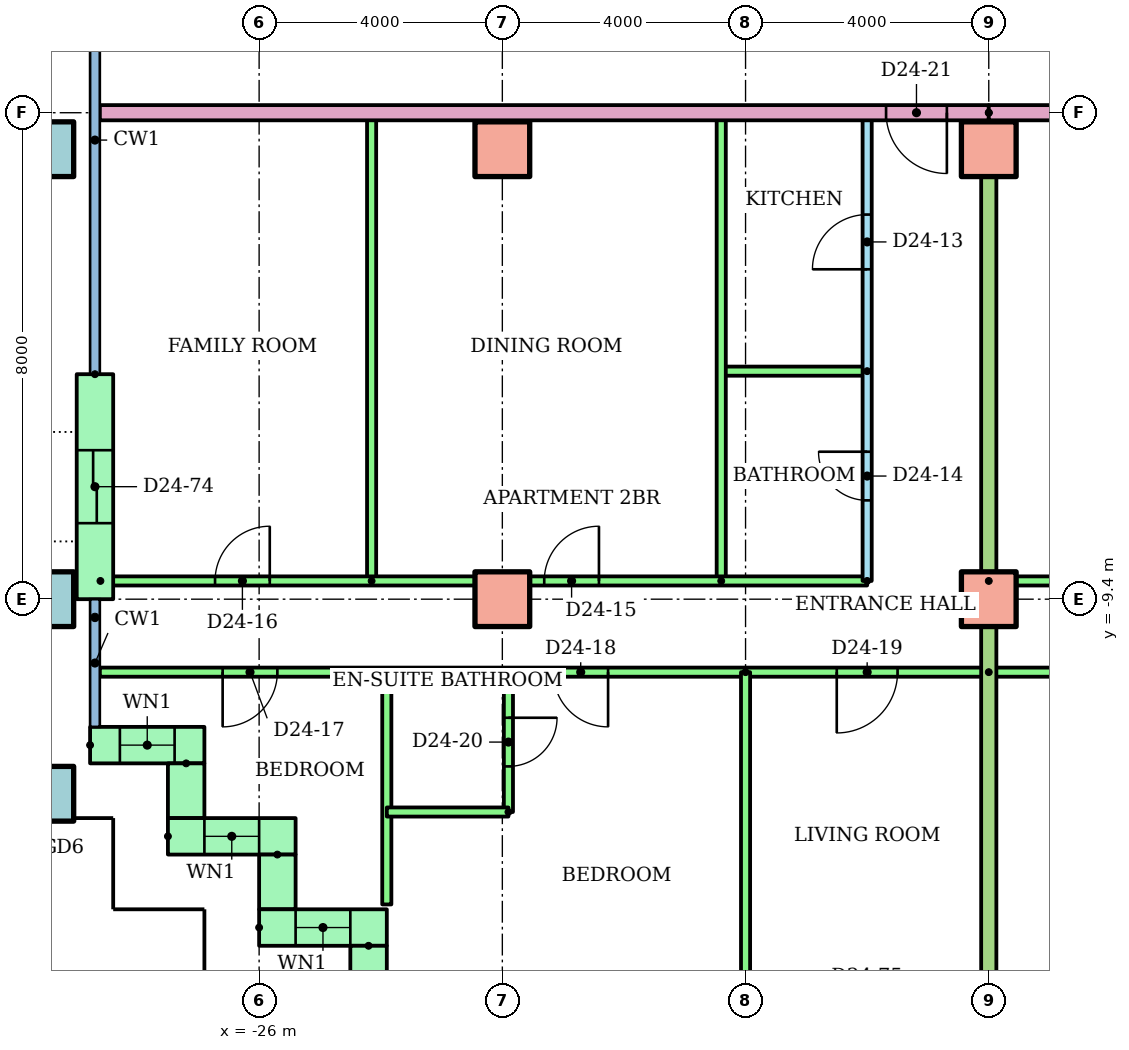
"""IFC4 building model, lengths in metres.
Left out: names, types, materials, properties, quantities, classifications, styles, units other than length and angle.
Written with IfcOpenShell. Run it as: python <this file> out.ifc"""

import sys

from ifc_helpers import new_model, si_unit, direction, frame, frame_2d, origin, origin_2d, place, context, subcontext, project, spatial, rectangle, hollow_rectangle, extrude, element, fill, save


model = new_model("IFC4")
c1 = context("Model", 3, precision=1e-05, world=origin(), true_north=direction((0.0, 1.0)))
c2 = subcontext(c1, "Body", "Model", "MODEL_VIEW")
j1 = project(units=[si_unit("LENGTHUNIT", "METRE"), si_unit("PLANEANGLEUNIT", "RADIAN")], contexts=[c1])
p1 = place(None, origin())
s1 = spatial("IfcSite", under=j1, at=p1, CompositionType="ELEMENT")
p2 = place(p1, origin())
s2 = spatial("IfcBuilding", under=s1, at=p2, CompositionType="ELEMENT")
p3 = place(p2, frame((0.0, 0.0, 93.5)))
s3 = spatial("IfcBuildingStorey", under=s2, at=p3, CompositionType="ELEMENT", Elevation=93.5)
for number, where in (
    (1, (-29.5, -12.6, 0.0)),
    (2, (-29.5, -9.4, 0.0)),
):
    element("IfcColumn", number, at=place(p3, frame(where)), inside=s3, PredefinedType="COLUMN", context=c2, shape_type="SweptSolid", body=[
        extrude(hollow_rectangle(XDim=0.9, YDim=0.9, WallThickness=0.045, at=origin_2d()), origin(), (0.0, 0.0, 1.0), 3.2),
    ])
for number, where in (
    (3, (-22.0, -9.4, 0.0)),
    (4, (-14.0, -9.4, 0.0)),
):
    element("IfcColumn", number, at=place(p3, frame(where)), inside=s3, PredefinedType="COLUMN", context=c2, shape_type="SweptSolid", body=[
        extrude(rectangle(XDim=0.9, YDim=0.9, at=origin_2d()), origin(), (0.0, 0.0, 1.0), 3.2),
    ])
p4 = place(p3, frame((-29.5, -2.0, 0.0)))
e5 = element("IfcColumn", 5, at=p4, inside=s3, PredefinedType="COLUMN", context=c2, shape_type="SweptSolid", body=[
    extrude(hollow_rectangle(XDim=0.9, YDim=0.9, WallThickness=0.045, at=origin_2d()), origin(), (0.0, 0.0, 1.0), 3.2),
])
for number, where in (
    (6, (-22.0, -2.0, 0.0)),
    (7, (-14.0, -2.0, 0.0)),
):
    element("IfcColumn", number, at=place(p3, frame(where)), inside=s3, PredefinedType="COLUMN", context=c2, shape_type="SweptSolid", body=[
        extrude(rectangle(XDim=0.9, YDim=0.9, at=origin_2d()), origin(), (0.0, 0.0, 1.0), 3.2),
    ])
p5 = place(p3, frame((-28.7, -5.7, 0.0), z_axis=(0.0, 0.0, 1.0), x_axis=(0.0, -1.0, 0.0)))
e8 = element("IfcWall", 8, at=p5, inside=s3, PredefinedType="STANDARD", context=c2, shape_type="SweptSolid", body=[
    extrude(rectangle(XDim=3.7, YDim=0.6, at=frame_2d((1.85, 0.0))), origin(), (0.0, 0.0, 1.0), 2.92),
])
p6 = place(p5, frame((1.25, 0.0, 0.0)))
e9 = element("IfcOpeningElement", 9, at=p6, cuts=e8, PredefinedType="OPENING", context=c2, shape_type="SweptSolid", body=[
    extrude(rectangle(XDim=1.2, YDim=2.1, at=frame_2d((0.6, 1.05))), frame((0.0, 0.31, 0.0), z_axis=(0.0, -1.0, 0.0), x_axis=(1.0, 0.0, 0.0)), (0.0, 0.0, 1.0), 0.62),
])
p7 = place(p3, frame((-28.78, -11.8, 0.0)))
e10 = element("IfcWall", 10, at=p7, inside=s3, PredefinedType="STANDARD", context=c2, shape_type="SweptSolid", body=[
    extrude(rectangle(XDim=1.88, YDim=0.6, at=frame_2d((0.94, 0.0))), origin(), (0.0, 0.0, 1.0), 2.92),
])
p8 = place(p7, frame((0.49, 0.0, 0.9)))
e11 = element("IfcOpeningElement", 11, at=p8, cuts=e10, PredefinedType="OPENING", context=c2, shape_type="SweptSolid", body=[
    extrude(rectangle(XDim=0.9, YDim=1.5, at=frame_2d((0.45, 0.75))), frame((0.0, 0.31, 0.0), z_axis=(0.0, -1.0, 0.0), x_axis=(1.0, 0.0, 0.0)), (0.0, 0.0, 1.0), 0.62),
])
p9 = place(p3, frame((-27.2, -12.1, 0.0), z_axis=(0.0, 0.0, 1.0), x_axis=(0.0, -1.0, 0.0)))
e12 = element("IfcWall", 12, at=p9, inside=s3, PredefinedType="STANDARD", context=c2, shape_type="SweptSolid", body=[
    extrude(rectangle(XDim=0.9, YDim=0.6, at=frame_2d((0.45, 0.0))), origin(), (0.0, 0.0, 1.0), 2.92),
])
p10 = place(p3, frame((-27.5, -13.3, 0.0)))
e13 = element("IfcWall", 13, at=p10, inside=s3, PredefinedType="STANDARD", context=c2, shape_type="SweptSolid", body=[
    extrude(rectangle(XDim=2.1, YDim=0.6, at=frame_2d((1.05, 0.0))), origin(), (0.0, 0.0, 1.0), 2.92),
])
p11 = place(p10, frame((0.6, 0.0, 0.9)))
e14 = element("IfcOpeningElement", 14, at=p11, cuts=e13, PredefinedType="OPENING", context=c2, shape_type="SweptSolid", body=[
    extrude(rectangle(XDim=0.9, YDim=1.5, at=frame_2d((0.45, 0.75))), frame((0.0, 0.31, 0.0), z_axis=(0.0, -1.0, 0.0), x_axis=(1.0, 0.0, 0.0)), (0.0, 0.0, 1.0), 0.62),
])
p12 = place(p3, frame((-25.7, -13.6, 0.0), z_axis=(0.0, 0.0, 1.0), x_axis=(0.0, -1.0, 0.0)))
e15 = element("IfcWall", 15, at=p12, inside=s3, PredefinedType="STANDARD", context=c2, shape_type="SweptSolid", body=[
    extrude(rectangle(XDim=0.9, YDim=0.6, at=frame_2d((0.45, 0.0))), origin(), (0.0, 0.0, 1.0), 2.92),
])
p13 = place(p3, frame((-26.0, -14.8, 0.0)))
e16 = element("IfcWall", 16, at=p13, inside=s3, PredefinedType="STANDARD", context=c2, shape_type="SweptSolid", body=[
    extrude(rectangle(XDim=2.1, YDim=0.6, at=frame_2d((1.05, 0.0))), origin(), (0.0, 0.0, 1.0), 2.92),
])
p14 = place(p13, frame((0.6, 0.0, 0.9)))
e17 = element("IfcOpeningElement", 17, at=p14, cuts=e16, PredefinedType="OPENING", context=c2, shape_type="SweptSolid", body=[
    extrude(rectangle(XDim=0.9, YDim=1.5, at=frame_2d((0.45, 0.75))), frame((0.0, 0.31, 0.0), z_axis=(0.0, -1.0, 0.0), x_axis=(1.0, 0.0, 0.0)), (0.0, 0.0, 1.0), 0.62),
])
p15 = place(p3, frame((-24.2, -15.1, 0.0), z_axis=(0.0, 0.0, 1.0), x_axis=(0.0, -1.0, 0.0)))
e18 = element("IfcWall", 18, at=p15, inside=s3, PredefinedType="STANDARD", context=c2, shape_type="SweptSolid", body=[
    extrude(rectangle(XDim=1.28, YDim=0.6, at=frame_2d((0.64, 0.0))), origin(), (0.0, 0.0, 1.0), 2.92),
])
p16 = place(p3, frame((-16.0, -9.1, 0.0), z_axis=(0.0, 0.0, 1.0), x_axis=(0.0, 1.0, 0.0)))
e19 = element("IfcWall", 19, at=p16, inside=s3, PredefinedType="PARTITIONING", context=c2, shape_type="SweptSolid", body=[
    extrude(rectangle(XDim=7.7, YDim=0.15, at=frame_2d((3.85, 0.0))), origin(), (0.0, 0.0, 1.0), 2.4),
])
p17 = place(p16, frame((5.125, 0.0, 0.0)))
e20 = element("IfcOpeningElement", 20, at=p17, cuts=e19, PredefinedType="OPENING", context=c2, shape_type="SweptSolid", body=[
    extrude(rectangle(XDim=0.9, YDim=2.1, at=frame_2d((0.45, 1.05))), frame((0.0, 0.085, 0.0), z_axis=(0.0, -1.0, 0.0), x_axis=(1.0, 0.0, 0.0)), (0.0, 0.0, 1.0), 0.17),
])
p18 = place(p16, frame((1.325, 0.0, 0.0)))
e21 = element("IfcOpeningElement", 21, at=p18, cuts=e19, PredefinedType="OPENING", context=c2, shape_type="SweptSolid", body=[
    extrude(rectangle(XDim=0.8, YDim=2.1, at=frame_2d((0.4, 1.05))), frame((0.0, 0.085, 0.0), z_axis=(0.0, -1.0, 0.0), x_axis=(1.0, 0.0, 0.0)), (0.0, 0.0, 1.0), 0.17),
])
p19 = place(p3, frame((-16.0, -5.65, 0.0), z_axis=(0.0, 0.0, 1.0), x_axis=(-1.0, 0.0, 0.0)))
e22 = element("IfcWall", 22, at=p19, inside=s3, PredefinedType="PARTITIONING", context=c2, shape_type="SweptSolid", body=[
    extrude(rectangle(XDim=2.4, YDim=0.15, at=frame_2d((1.2, 0.0))), origin(), (0.0, 0.0, 1.0), 2.4),
])
for number, where, z_axis, x_axis in (
    (23, (-18.4, -9.1, 0.0), (0.0, 0.0, 1.0), (0.0, 1.0, 0.0)),
    (24, (-24.15, -9.1, 0.0), (0.0, 0.0, 1.0), (0.0, 1.0, 0.0)),
):
    element("IfcWall", number, at=place(p3, frame(where, z_axis=z_axis, x_axis=x_axis)), inside=s3, PredefinedType="PARTITIONING", context=c2, shape_type="SweptSolid", body=[
        extrude(rectangle(XDim=7.7, YDim=0.15, at=frame_2d((3.85, 0.0))), origin(), (0.0, 0.0, 1.0), 2.4),
    ])
p20 = place(p3, frame((-28.61, -9.1, 0.0)))
e25 = element("IfcWall", 25, at=p20, inside=s3, PredefinedType="PARTITIONING", context=c2, shape_type="SweptSolid", body=[
    extrude(rectangle(XDim=12.61, YDim=0.15, at=frame_2d((6.305, 0.0))), origin(), (0.0, 0.0, 1.0), 2.4),
])
p21 = place(p20, frame((7.299, 0.0, 0.0)))
e26 = element("IfcOpeningElement", 26, at=p21, cuts=e25, PredefinedType="OPENING", context=c2, shape_type="SweptSolid", body=[
    extrude(rectangle(XDim=0.9, YDim=2.1, at=frame_2d((0.45, 1.05))), frame((0.0, 0.085, 0.0), z_axis=(0.0, -1.0, 0.0), x_axis=(1.0, 0.0, 0.0)), (0.0, 0.0, 1.0), 0.17),
])
p22 = place(p20, frame((1.885, 0.0, 0.0)))
e27 = element("IfcOpeningElement", 27, at=p22, cuts=e25, PredefinedType="OPENING", context=c2, shape_type="SweptSolid", body=[
    extrude(rectangle(XDim=0.9, YDim=2.1, at=frame_2d((0.45, 1.05))), frame((0.0, 0.085, 0.0), z_axis=(0.0, -1.0, 0.0), x_axis=(1.0, 0.0, 0.0)), (0.0, 0.0, 1.0), 0.17),
])
p23 = place(p3, frame((-14.0, -10.6, 0.0), z_axis=(0.0, 0.0, 1.0), x_axis=(-1.0, 0.0, 0.0)))
e28 = element("IfcWall", 28, at=p23, inside=s3, PredefinedType="PARTITIONING", context=c2, shape_type="SweptSolid", body=[
    extrude(rectangle(XDim=14.62, YDim=0.15, at=frame_2d((7.31, 0.0))), origin(), (0.0, 0.0, 1.0), 2.4),
])
p24 = place(p23, frame((11.7, 0.0, 0.0)))
e29 = element("IfcOpeningElement", 29, at=p24, cuts=e28, PredefinedType="OPENING", context=c2, shape_type="SweptSolid", body=[
    extrude(rectangle(XDim=0.9, YDim=2.1, at=frame_2d((0.45, 1.05))), frame((0.0, 0.085, 0.0), z_axis=(0.0, -1.0, 0.0), x_axis=(1.0, 0.0, 0.0)), (0.0, 0.0, 1.0), 0.17),
])
p25 = place(p23, frame((6.261, 0.0, 0.0)))
e30 = element("IfcOpeningElement", 30, at=p25, cuts=e28, PredefinedType="OPENING", context=c2, shape_type="SweptSolid", body=[
    extrude(rectangle(XDim=0.9, YDim=2.1, at=frame_2d((0.45, 1.05))), frame((0.0, 0.085, 0.0), z_axis=(0.0, -1.0, 0.0), x_axis=(1.0, 0.0, 0.0)), (0.0, 0.0, 1.0), 0.17),
])
p26 = place(p23, frame((1.5, 0.0, 0.0)))
e31 = element("IfcOpeningElement", 31, at=p26, cuts=e28, PredefinedType="OPENING", context=c2, shape_type="SweptSolid", body=[
    extrude(rectangle(XDim=1.0, YDim=2.1, at=frame_2d((0.5, 1.05))), frame((0.0, 0.085, 0.0), z_axis=(0.0, -1.0, 0.0), x_axis=(1.0, 0.0, 0.0)), (0.0, 0.0, 1.0), 0.17),
])
p27 = place(p3, frame((-23.9, -10.6, 0.0), z_axis=(0.0, 0.0, 1.0), x_axis=(0.0, -1.0, 0.0)))
e32 = element("IfcWall", 32, at=p27, inside=s3, PredefinedType="PARTITIONING", context=c2, shape_type="SweptSolid", body=[
    extrude(rectangle(XDim=3.82, YDim=0.15, at=frame_2d((1.91, 0.0))), origin(), (0.0, 0.0, 1.0), 2.4),
])
p28 = place(p3, frame((-18.0, -10.6, 0.0), z_axis=(0.0, 0.0, 1.0), x_axis=(0.0, -1.0, 0.0)))
e33 = element("IfcWall", 33, at=p28, inside=s3, PredefinedType="PARTITIONING", context=c2, shape_type="SweptSolid", body=[
    extrude(rectangle(XDim=5.621, YDim=0.15, at=frame_2d((2.811, 0.0))), origin(), (0.0, 0.0, 1.0), 2.4),
])
p29 = place(p3, frame((-21.9, -10.6, 0.0), z_axis=(0.0, 0.0, 1.0), x_axis=(0.0, -1.0, 0.0)))
e34 = element("IfcWall", 34, at=p29, inside=s3, PredefinedType="PARTITIONING", context=c2, shape_type="SweptSolid", body=[
    extrude(rectangle(XDim=2.3, YDim=0.15, at=frame_2d((1.15, 0.0))), origin(), (0.0, 0.0, 1.0), 2.4),
])
p30 = place(p29, frame((0.75, 0.0, 0.0)))
e35 = element("IfcOpeningElement", 35, at=p30, cuts=e34, PredefinedType="OPENING", context=c2, shape_type="SweptSolid", body=[
    extrude(rectangle(XDim=0.8, YDim=2.1, at=frame_2d((0.4, 1.05))), frame((0.0, 0.085, 0.0), z_axis=(0.0, -1.0, 0.0), x_axis=(1.0, 0.0, 0.0)), (0.0, 0.0, 1.0), 0.17),
])
p31 = place(p3, frame((-21.9, -12.9, 0.0), z_axis=(0.0, 0.0, 1.0), x_axis=(-1.0, 0.0, 0.0)))
e36 = element("IfcWall", 36, at=p31, inside=s3, PredefinedType="PARTITIONING", context=c2, shape_type="SweptSolid", body=[
    extrude(rectangle(XDim=2.0, YDim=0.15, at=frame_2d((1.0, 0.0))), origin(), (0.0, 0.0, 1.0), 2.4),
])
p32 = place(p3, frame((-14.0, -9.1, 0.0)))
e37 = element("IfcWall", 37, at=p32, inside=s3, PredefinedType="PARTITIONING", context=c2, shape_type="SweptSolid", body=[
    extrude(rectangle(XDim=14.0, YDim=0.15, at=frame_2d((7.0, 0.0))), origin(), (0.0, 0.0, 1.0), 2.4),
])
p33 = place(p32, frame((9.65, 0.0, 0.0)))
e38 = element("IfcOpeningElement", 38, at=p33, cuts=e37, PredefinedType="OPENING", context=c2, shape_type="SweptSolid", body=[
    extrude(rectangle(XDim=0.9, YDim=2.1, at=frame_2d((0.45, 1.05))), frame((0.0, 0.085, 0.0), z_axis=(0.0, -1.0, 0.0), x_axis=(1.0, 0.0, 0.0)), (0.0, 0.0, 1.0), 0.17),
])
p34 = place(p32, frame((6.275, 0.0, 0.0)))
e39 = element("IfcOpeningElement", 39, at=p34, cuts=e37, PredefinedType="OPENING", context=c2, shape_type="SweptSolid", body=[
    extrude(rectangle(XDim=0.9, YDim=2.1, at=frame_2d((0.45, 1.05))), frame((0.0, 0.085, 0.0), z_axis=(0.0, -1.0, 0.0), x_axis=(1.0, 0.0, 0.0)), (0.0, 0.0, 1.0), 0.17),
])
p35 = place(p32, frame((1.975, 0.0, 0.0)))
e40 = element("IfcOpeningElement", 40, at=p35, cuts=e37, PredefinedType="OPENING", context=c2, shape_type="SweptSolid", body=[
    extrude(rectangle(XDim=0.9, YDim=2.1, at=frame_2d((0.45, 1.05))), frame((0.0, 0.085, 0.0), z_axis=(0.0, -1.0, 0.0), x_axis=(1.0, 0.0, 0.0)), (0.0, 0.0, 1.0), 0.17),
])
p36 = place(p3, frame((2.0, -10.6, 0.0), z_axis=(0.0, 0.0, 1.0), x_axis=(-1.0, 0.0, 0.0)))
e41 = element("IfcWall", 41, at=p36, inside=s3, PredefinedType="PARTITIONING", context=c2, shape_type="SweptSolid", body=[
    extrude(rectangle(XDim=16.0, YDim=0.15, at=frame_2d((8.0, 0.0))), origin(), (0.0, 0.0, 1.0), 2.4),
])
p37 = place(p36, frame((13.55, 0.0, 0.0)))
e42 = element("IfcOpeningElement", 42, at=p37, cuts=e41, PredefinedType="OPENING", context=c2, shape_type="SweptSolid", body=[
    extrude(rectangle(XDim=0.9, YDim=2.1, at=frame_2d((0.45, 1.05))), frame((0.0, 0.085, 0.0), z_axis=(0.0, -1.0, 0.0), x_axis=(1.0, 0.0, 0.0)), (0.0, 0.0, 1.0), 0.17),
])
p38 = place(p36, frame((9.55, 0.0, 0.0)))
e43 = element("IfcOpeningElement", 43, at=p38, cuts=e41, PredefinedType="OPENING", context=c2, shape_type="SweptSolid", body=[
    extrude(rectangle(XDim=0.9, YDim=2.1, at=frame_2d((0.45, 1.05))), frame((0.0, 0.085, 0.0), z_axis=(0.0, -1.0, 0.0), x_axis=(1.0, 0.0, 0.0)), (0.0, 0.0, 1.0), 0.17),
])
p39 = place(p36, frame((3.5, 0.0, 0.0)))
e44 = element("IfcOpeningElement", 44, at=p39, cuts=e41, PredefinedType="OPENING", context=c2, shape_type="SweptSolid", body=[
    extrude(rectangle(XDim=1.0, YDim=2.1, at=frame_2d((0.5, 1.05))), frame((0.0, 0.085, 0.0), z_axis=(0.0, -1.0, 0.0), x_axis=(1.0, 0.0, 0.0)), (0.0, 0.0, 1.0), 0.17),
])
p40 = place(p3, frame((-14.0, -1.4, 0.0), z_axis=(0.0, 0.0, 1.0), x_axis=(0.0, -1.0, 0.0)))
e45 = element("IfcWall", 45, at=p40, inside=s3, PredefinedType="PARTITIONING", context=c2, shape_type="SweptSolid", body=[
    extrude(rectangle(XDim=14.81, YDim=0.25, at=frame_2d((7.405, 0.0))), origin(), (0.0, 0.0, 1.0), 2.4),
])
p41 = place(p3, frame((-14.0, -1.4, 0.0), z_axis=(0.0, 0.0, 1.0), x_axis=(-1.0, 0.0, 0.0)))
e46 = element("IfcWall", 46, at=p41, inside=s3, PredefinedType="PARTITIONING", context=c2, shape_type="SweptSolid", body=[
    extrude(rectangle(XDim=14.62, YDim=0.25, at=frame_2d((7.31, 0.0))), origin(), (0.0, 0.0, 1.0), 2.4),
])
p42 = place(p41, frame((0.689, 0.0, 0.0)))
e47 = element("IfcOpeningElement", 47, at=p42, cuts=e46, PredefinedType="OPENING", context=c2, shape_type="SweptSolid", body=[
    extrude(rectangle(XDim=1.0, YDim=2.1, at=frame_2d((0.5, 1.05))), frame((0.0, 0.135, 0.0), z_axis=(0.0, -1.0, 0.0), x_axis=(1.0, 0.0, 0.0)), (0.0, 0.0, 1.0), 0.27),
])
p43 = place(p3, frame((14.0, -1.4, 0.0), z_axis=(0.0, 0.0, 1.0), x_axis=(-1.0, 0.0, 0.0)))
e48 = element("IfcWall", 48, at=p43, inside=s3, PredefinedType="PARTITIONING", context=c2, shape_type="SweptSolid", body=[
    extrude(rectangle(XDim=28.0, YDim=0.25, at=frame_2d((14.0, 0.0))), origin(), (0.0, 0.0, 1.0), 2.4),
])
p44 = place(p43, frame((12.689, 0.0, 0.0)))
e49 = element("IfcOpeningElement", 49, at=p44, cuts=e48, PredefinedType="OPENING", context=c2, shape_type="SweptSolid", body=[
    extrude(rectangle(XDim=1.0, YDim=2.1, at=frame_2d((0.5, 1.05))), frame((0.0, 0.135, 0.0), z_axis=(0.0, -1.0, 0.0), x_axis=(1.0, 0.0, 0.0)), (0.0, 0.0, 1.0), 0.27),
])
p45 = place(p43, frame((10.311, 0.0, 0.0)))
e50 = element("IfcOpeningElement", 50, at=p45, cuts=e48, PredefinedType="OPENING", context=c2, shape_type="SweptSolid", body=[
    extrude(rectangle(XDim=1.0, YDim=2.1, at=frame_2d((0.5, 1.05))), frame((0.0, 0.135, 0.0), z_axis=(0.0, -1.0, 0.0), x_axis=(1.0, 0.0, 0.0)), (0.0, 0.0, 1.0), 0.27),
])
p46 = place(p8, origin())
e51 = element("IfcWindow", 51, at=p46, inside=s3, PartitioningType="SINGLE_PANEL", PredefinedType="WINDOW", context=c2, shape_type="SweptSolid", body=[
    extrude(rectangle(XDim=0.9, YDim=1.5, at=frame_2d((0.45, 0.75))), frame((0.0, 0.03, 0.0), z_axis=(0.0, -1.0, 0.0), x_axis=(1.0, 0.0, 0.0)), (0.0, 0.0, 1.0), 0.06),
])
fill(e11, e51)
p47 = place(p11, origin())
e52 = element("IfcWindow", 52, at=p47, inside=s3, PartitioningType="SINGLE_PANEL", PredefinedType="WINDOW", context=c2, shape_type="SweptSolid", body=[
    extrude(rectangle(XDim=0.9, YDim=1.5, at=frame_2d((0.45, 0.75))), frame((0.0, 0.03, 0.0), z_axis=(0.0, -1.0, 0.0), x_axis=(1.0, 0.0, 0.0)), (0.0, 0.0, 1.0), 0.06),
])
fill(e14, e52)
p48 = place(p14, origin())
e53 = element("IfcWindow", 53, at=p48, inside=s3, PartitioningType="SINGLE_PANEL", PredefinedType="WINDOW", context=c2, shape_type="SweptSolid", body=[
    extrude(rectangle(XDim=0.9, YDim=1.5, at=frame_2d((0.45, 0.75))), frame((0.0, 0.03, 0.0), z_axis=(0.0, -1.0, 0.0), x_axis=(1.0, 0.0, 0.0)), (0.0, 0.0, 1.0), 0.06),
])
fill(e17, e53)
p49 = place(p17, origin())
e54 = element("IfcDoor", 54, at=p49, inside=s3, OperationType="SINGLE_SWING_LEFT", PredefinedType="DOOR", context=c2, shape_type="SweptSolid", body=[
    extrude(rectangle(XDim=0.9, YDim=2.1, at=frame_2d((0.45, 1.05))), frame((0.0, 0.025, 0.0), z_axis=(0.0, -1.0, 0.0), x_axis=(1.0, 0.0, 0.0)), (0.0, 0.0, 1.0), 0.05),
])
fill(e20, e54)
p50 = place(p18, origin())
e55 = element("IfcDoor", 55, at=p50, inside=s3, OperationType="SINGLE_SWING_RIGHT", PredefinedType="DOOR", context=c2, shape_type="SweptSolid", body=[
    extrude(rectangle(XDim=0.8, YDim=2.1, at=frame_2d((0.4, 1.05))), frame((0.0, 0.025, 0.0), z_axis=(0.0, -1.0, 0.0), x_axis=(1.0, 0.0, 0.0)), (0.0, 0.0, 1.0), 0.05),
])
fill(e21, e55)
p51 = place(p21, origin())
e56 = element("IfcDoor", 56, at=p51, inside=s3, OperationType="SINGLE_SWING_RIGHT", PredefinedType="DOOR", context=c2, shape_type="SweptSolid", body=[
    extrude(rectangle(XDim=0.9, YDim=2.1, at=frame_2d((0.45, 1.05))), frame((0.0, 0.025, 0.0), z_axis=(0.0, -1.0, 0.0), x_axis=(1.0, 0.0, 0.0)), (0.0, 0.0, 1.0), 0.05),
])
fill(e26, e56)
p52 = place(p22, origin())
e57 = element("IfcDoor", 57, at=p52, inside=s3, OperationType="SINGLE_SWING_RIGHT", PredefinedType="DOOR", context=c2, shape_type="SweptSolid", body=[
    extrude(rectangle(XDim=0.9, YDim=2.1, at=frame_2d((0.45, 1.05))), frame((0.0, 0.025, 0.0), z_axis=(0.0, -1.0, 0.0), x_axis=(1.0, 0.0, 0.0)), (0.0, 0.0, 1.0), 0.05),
])
fill(e27, e57)
p53 = place(p24, origin())
e58 = element("IfcDoor", 58, at=p53, inside=s3, OperationType="SINGLE_SWING_RIGHT", PredefinedType="DOOR", context=c2, shape_type="SweptSolid", body=[
    extrude(rectangle(XDim=0.9, YDim=2.1, at=frame_2d((0.45, 1.05))), frame((0.0, 0.025, 0.0), z_axis=(0.0, -1.0, 0.0), x_axis=(1.0, 0.0, 0.0)), (0.0, 0.0, 1.0), 0.05),
])
fill(e29, e58)
p54 = place(p25, origin())
e59 = element("IfcDoor", 59, at=p54, inside=s3, OperationType="SINGLE_SWING_LEFT", PredefinedType="DOOR", context=c2, shape_type="SweptSolid", body=[
    extrude(rectangle(XDim=0.9, YDim=2.1, at=frame_2d((0.45, 1.05))), frame((0.0, 0.025, 0.0), z_axis=(0.0, -1.0, 0.0), x_axis=(1.0, 0.0, 0.0)), (0.0, 0.0, 1.0), 0.05),
])
fill(e30, e59)
p55 = place(p26, origin())
e60 = element("IfcDoor", 60, at=p55, inside=s3, OperationType="SINGLE_SWING_RIGHT", PredefinedType="DOOR", context=c2, shape_type="SweptSolid", body=[
    extrude(rectangle(XDim=1.0, YDim=2.1, at=frame_2d((0.5, 1.05))), frame((0.0, 0.025, 0.0), z_axis=(0.0, -1.0, 0.0), x_axis=(1.0, 0.0, 0.0)), (0.0, 0.0, 1.0), 0.05),
])
fill(e31, e60)
p56 = place(p30, origin())
e61 = element("IfcDoor", 61, at=p56, inside=s3, OperationType="SINGLE_SWING_LEFT", PredefinedType="DOOR", context=c2, shape_type="SweptSolid", body=[
    extrude(rectangle(XDim=0.8, YDim=2.1, at=frame_2d((0.4, 1.05))), frame((0.0, 0.025, 0.0), z_axis=(0.0, -1.0, 0.0), x_axis=(1.0, 0.0, 0.0)), (0.0, 0.0, 1.0), 0.05),
])
fill(e35, e61)
p57 = place(p42, origin())
e62 = element("IfcDoor", 62, at=p57, inside=s3, OperationType="SINGLE_SWING_LEFT", PredefinedType="DOOR", context=c2, shape_type="SweptSolid", body=[
    extrude(rectangle(XDim=1.0, YDim=2.1, at=frame_2d((0.5, 1.05))), frame((0.0, 0.025, 0.0), z_axis=(0.0, -1.0, 0.0), x_axis=(1.0, 0.0, 0.0)), (0.0, 0.0, 1.0), 0.05),
])
fill(e47, e62)
p58 = place(p6, origin())
e63 = element("IfcDoor", 63, at=p58, inside=s3, OperationType="SLIDING_TO_LEFT", PredefinedType="DOOR", context=c2, shape_type="SweptSolid", body=[
    extrude(rectangle(XDim=1.2, YDim=2.1, at=frame_2d((0.6, 1.05))), frame((0.0, 0.025, 0.0), z_axis=(0.0, -1.0, 0.0), x_axis=(1.0, 0.0, 0.0)), (0.0, 0.0, 1.0), 0.05),
])
fill(e9, e63)
save(model, sys.argv[1])
